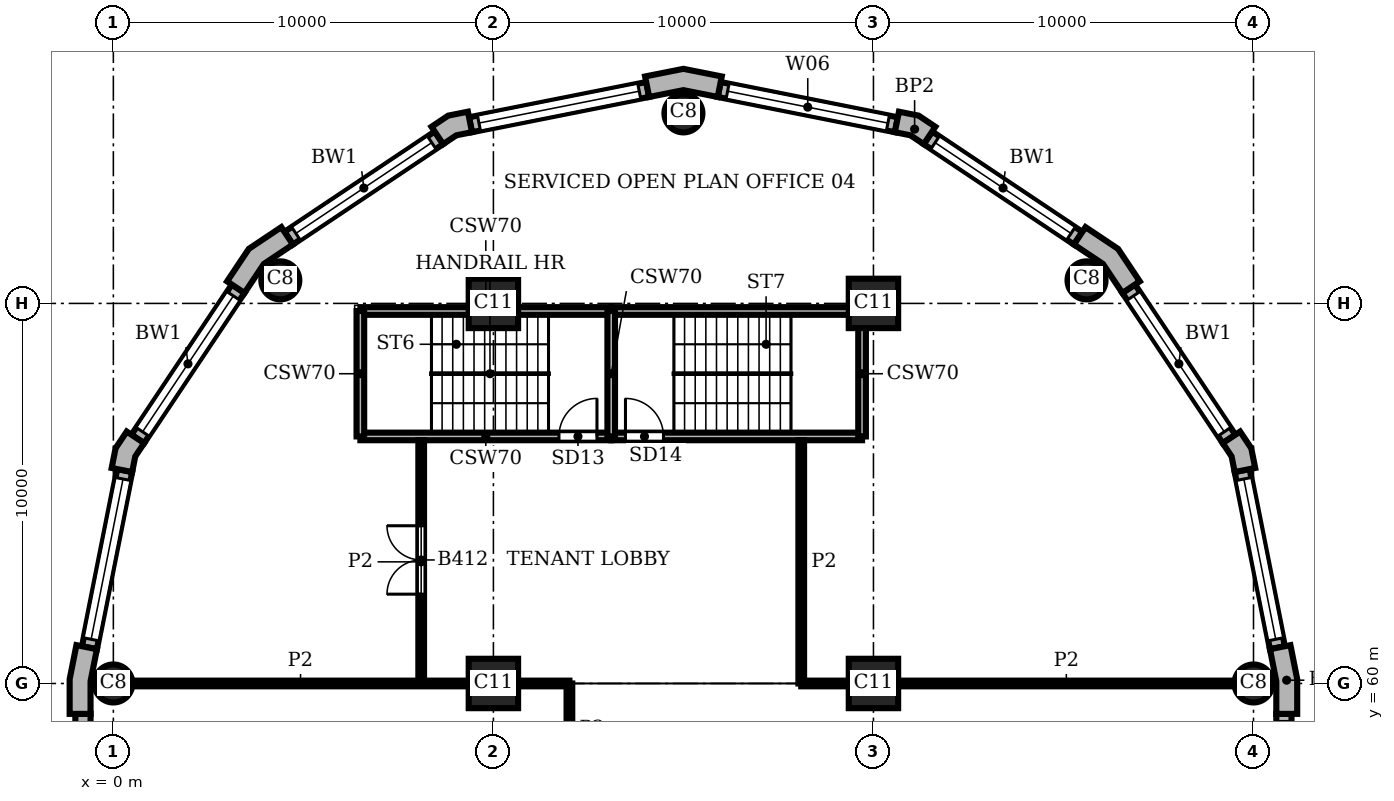
"""IFC4 building model, lengths in metres.
Left out: names, types, materials, properties, quantities, classifications, styles, units other than length and angle.
Written with IfcOpenShell. Run it as: python <this file> out.ifc"""

import sys

from ifc_helpers import new_model, si_unit, direction, frame, frame_2d, origin, origin_2d, place, context, subcontext, project, spatial, polyline, rectangle, circle, outline, extrude, element, fill, save


model = new_model("IFC4")
c1 = context("Model", 3, precision=1e-05, world=origin(), true_north=direction((0.0, 1.0)))
c2 = subcontext(c1, "Body", "Model", "MODEL_VIEW")
j1 = project(units=[si_unit("LENGTHUNIT", "METRE"), si_unit("PLANEANGLEUNIT", "RADIAN")], contexts=[c1])
p1 = place(None, origin())
s1 = spatial("IfcSite", under=j1, at=p1, CompositionType="ELEMENT")
p2 = place(p1, origin())
s2 = spatial("IfcBuilding", under=s1, at=p2, CompositionType="ELEMENT")
p3 = place(p2, frame((0.0, 0.0, 170.7)))
s3 = spatial("IfcBuildingStorey", under=s2, at=p3, CompositionType="ELEMENT", Elevation=170.7)
for number, where, z_axis, x_axis in (
    (1, (30.0, 60.0, 0.0), (0.0, 0.0, 1.0), (1.0, 0.0, 0.0)),
    (2, (25.607, 70.607, 0.0), (0.0, 0.0, 1.0), (1.0, 0.0, 0.0)),
    (3, (15.0, 75.0, 0.0), (0.0, 0.0, 1.0), (1.0, 0.0, 0.0)),
    (4, (4.393, 70.607, 0.0), (0.0, 0.0, 1.0), (1.0, 0.0, 0.0)),
    (5, (0.0, 60.0, 0.0), (0.0, 0.0, 1.0), (1.0, 0.0, 0.0)),
):
    element("IfcColumn", number, at=place(p3, frame(where, z_axis=z_axis, x_axis=x_axis)), inside=s3, PredefinedType="COLUMN", context=c2, shape_type="SweptSolid", body=[
        extrude(circle(Radius=0.5, at=origin_2d()), origin(), (0.0, 0.0, 1.0), 3.9),
    ])
for number, where, z_axis, x_axis in (
    (6, (10.0, 60.0, 0.0), (0.0, 0.0, 1.0), (1.0, 0.0, 0.0)),
    (7, (10.0, 70.0, 0.0), (0.0, 0.0, 1.0), (1.0, 0.0, 0.0)),
    (8, (20.0, 60.0, 0.0), (0.0, 0.0, 1.0), (1.0, 0.0, 0.0)),
    (9, (20.0, 70.0, 0.0), (0.0, 0.0, 1.0), (1.0, 0.0, 0.0)),
):
    element("IfcColumn", number, at=place(p3, frame(where, z_axis=z_axis, x_axis=x_axis)), inside=s3, PredefinedType="COLUMN", context=c2, shape_type="SweptSolid", body=[
        extrude(rectangle(XDim=1.3, YDim=1.3, at=origin_2d()), origin(), (0.0, 0.0, 1.0), 3.9),
    ])
p4 = place(p3, origin())
e10 = element("IfcWall", 10, at=p4, inside=s3, PredefinedType="SOLIDWALL", context=c2, shape_type="SweptSolid", body=[
    extrude(outline(polyline([(31.0, 59.2), (31.15, 59.2), (31.15, 60.113), (30.972, 61.009), (30.825, 60.98), (30.432, 60.902), (30.6, 60.059), (30.6, 59.2), (31.0, 59.2)])), origin(), (0.0, 0.0, 1.0), 3.9),
])
e11 = element("IfcWall", 11, at=p4, inside=s3, PredefinedType="SOLIDWALL", context=c2, shape_type="SweptSolid", body=[
    extrude(outline(polyline([(29.897, 65.641), (30.045, 65.67), (29.941, 66.189), (29.648, 66.629), (29.523, 66.545), (29.19, 66.323), (29.423, 65.974), (29.505, 65.563), (29.897, 65.641)])), origin(), (0.0, 0.0, 1.0), 3.9),
])
e12 = element("IfcWall", 12, at=p4, inside=s3, PredefinedType="SOLIDWALL", context=c2, shape_type="SweptSolid", body=[
    extrude(outline(polyline([(26.883, 70.497), (27.007, 70.58), (26.436, 71.436), (25.58, 72.007), (25.497, 71.883), (25.275, 71.55), (26.039, 71.039), (26.55, 70.275), (26.883, 70.497)])), origin(), (0.0, 0.0, 1.0), 3.9),
])
e13 = element("IfcWall", 13, at=p4, inside=s3, PredefinedType="SOLIDWALL", context=c2, shape_type="SweptSolid", body=[
    extrude(outline(polyline([(21.545, 74.523), (21.629, 74.648), (21.189, 74.941), (20.67, 75.045), (20.641, 74.897), (20.563, 74.505), (20.974, 74.423), (21.323, 74.19), (21.545, 74.523)])), origin(), (0.0, 0.0, 1.0), 3.9),
])
e14 = element("IfcWall", 14, at=p4, inside=s3, PredefinedType="SOLIDWALL", context=c2, shape_type="SweptSolid", body=[
    extrude(outline(polyline([(15.98, 75.825), (16.009, 75.972), (15.0, 76.173), (13.991, 75.972), (14.02, 75.825), (14.098, 75.432), (15.0, 75.612), (15.902, 75.432), (15.98, 75.825)])), origin(), (0.0, 0.0, 1.0), 3.9),
])
e15 = element("IfcWall", 15, at=p4, inside=s3, PredefinedType="SOLIDWALL", context=c2, shape_type="SweptSolid", body=[
    extrude(outline(polyline([(9.359, 74.897), (9.33, 75.045), (8.811, 74.941), (8.371, 74.648), (8.455, 74.523), (8.677, 74.19), (9.026, 74.423), (9.437, 74.505), (9.359, 74.897)])), origin(), (0.0, 0.0, 1.0), 3.9),
])
e16 = element("IfcWall", 16, at=p4, inside=s3, PredefinedType="SOLIDWALL", context=c2, shape_type="SweptSolid", body=[
    extrude(outline(polyline([(4.503, 71.883), (4.42, 72.007), (3.564, 71.436), (2.993, 70.58), (3.117, 70.497), (3.45, 70.275), (3.961, 71.039), (4.725, 71.55), (4.503, 71.883)])), origin(), (0.0, 0.0, 1.0), 3.9),
])
e17 = element("IfcWall", 17, at=p4, inside=s3, PredefinedType="SOLIDWALL", context=c2, shape_type="SweptSolid", body=[
    extrude(outline(polyline([(0.477, 66.545), (0.352, 66.629), (0.059, 66.189), (-0.045, 65.67), (0.103, 65.641), (0.495, 65.563), (0.577, 65.974), (0.81, 66.323), (0.477, 66.545)])), origin(), (0.0, 0.0, 1.0), 3.9),
])
e18 = element("IfcWall", 18, at=p4, inside=s3, PredefinedType="SOLIDWALL", context=c2, shape_type="SweptSolid", body=[
    extrude(outline(polyline([(-0.825, 60.98), (-0.972, 61.009), (-1.15, 60.113), (-1.15, 59.2), (-1.0, 59.2), (-0.6, 59.2), (-0.6, 60.059), (-0.432, 60.902), (-0.825, 60.98)])), origin(), (0.0, 0.0, 1.0), 3.9),
])
p5 = place(p3, frame((30.8, 40.8, 0.0), z_axis=(0.0, 0.0, 1.0), x_axis=(0.0, 1.0, 0.0)))
e19 = element("IfcWall", 19, at=p5, inside=s3, PredefinedType="SOLIDWALL", context=c2, shape_type="SweptSolid", body=[
    extrude(rectangle(XDim=18.4, YDim=0.4, at=frame_2d((9.2, 0.0))), origin(), (0.0, 0.0, 1.0), 3.9),
])
p6 = place(p5, frame((0.2, 0.0, 0.9)))
e20 = element("IfcOpeningElement", 20, at=p6, cuts=e19, PredefinedType="OPENING", context=c2, shape_type="SweptSolid", body=[
    extrude(rectangle(XDim=8.0, YDim=2.35, at=frame_2d((4.0, 1.175))), frame((0.0, 0.21, 0.0), z_axis=(0.0, -1.0, 0.0), x_axis=(1.0, 0.0, 0.0)), (0.0, 0.0, 1.0), 0.42),
])
p7 = place(p5, frame((10.2, 0.0, 0.9)))
e21 = element("IfcOpeningElement", 21, at=p7, cuts=e19, PredefinedType="OPENING", context=c2, shape_type="SweptSolid", body=[
    extrude(rectangle(XDim=8.0, YDim=2.35, at=frame_2d((4.0, 1.175))), frame((0.0, 0.21, 0.0), z_axis=(0.0, -1.0, 0.0), x_axis=(1.0, 0.0, 0.0)), (0.0, 0.0, 1.0), 0.42),
])
p8 = place(p3, frame((30.629, 60.941, 0.0), z_axis=(0.0, 0.0, 1.0), x_axis=(-0.195098533057, 0.98078364709, 0.0)))
e22 = element("IfcWall", 22, at=p8, inside=s3, PredefinedType="SOLIDWALL", context=c2, shape_type="SweptSolid", body=[
    extrude(rectangle(XDim=4.753, YDim=0.4, at=frame_2d((2.376, 0.0))), origin(), (0.0, 0.0, 1.0), 3.9),
])
p9 = place(p8, frame((0.226, 0.0, 0.9)))
e23 = element("IfcOpeningElement", 23, at=p9, cuts=e22, PredefinedType="OPENING", context=c2, shape_type="SweptSolid", body=[
    extrude(rectangle(XDim=4.3, YDim=2.35, at=frame_2d((2.15, 1.175))), frame((0.0, 0.21, 0.0), z_axis=(0.0, -1.0, 0.0), x_axis=(1.0, 0.0, 0.0)), (0.0, 0.0, 1.0), 0.42),
])
p10 = place(p3, frame((29.357, 66.434, 0.0), z_axis=(0.0, 0.0, 1.0), x_axis=(-0.555541552266, 0.831488775454, 0.0)))
e24 = element("IfcWall", 24, at=p10, inside=s3, PredefinedType="SOLIDWALL", context=c2, shape_type="SweptSolid", body=[
    extrude(rectangle(XDim=4.753, YDim=0.4, at=frame_2d((2.376, 0.0))), origin(), (0.0, 0.0, 1.0), 3.9),
])
p11 = place(p10, frame((0.226, 0.0, 0.9)))
e25 = element("IfcOpeningElement", 25, at=p11, cuts=e24, PredefinedType="OPENING", context=c2, shape_type="SweptSolid", body=[
    extrude(rectangle(XDim=4.3, YDim=2.35, at=frame_2d((2.15, 1.175))), frame((0.0, 0.21, 0.0), z_axis=(0.0, -1.0, 0.0), x_axis=(1.0, 0.0, 0.0)), (0.0, 0.0, 1.0), 0.42),
])
p12 = place(p3, frame((25.386, 71.716, 0.0), z_axis=(0.0, 0.0, 1.0), x_axis=(-0.831488775454, 0.555541552266, 0.0)))
e26 = element("IfcWall", 26, at=p12, inside=s3, PredefinedType="SOLIDWALL", context=c2, shape_type="SweptSolid", body=[
    extrude(rectangle(XDim=4.753, YDim=0.4, at=frame_2d((2.376, 0.0))), origin(), (0.0, 0.0, 1.0), 3.9),
])
p13 = place(p12, frame((0.226, 0.0, 0.9)))
e27 = element("IfcOpeningElement", 27, at=p13, cuts=e26, PredefinedType="OPENING", context=c2, shape_type="SweptSolid", body=[
    extrude(rectangle(XDim=4.3, YDim=2.35, at=frame_2d((2.15, 1.175))), frame((0.0, 0.21, 0.0), z_axis=(0.0, -1.0, 0.0), x_axis=(1.0, 0.0, 0.0)), (0.0, 0.0, 1.0), 0.42),
])
p14 = place(p3, frame((20.602, 74.701, 0.0), z_axis=(0.0, 0.0, 1.0), x_axis=(-0.98078364709, 0.195098533057, 0.0)))
e28 = element("IfcWall", 28, at=p14, inside=s3, PredefinedType="SOLIDWALL", context=c2, shape_type="SweptSolid", body=[
    extrude(rectangle(XDim=4.753, YDim=0.4, at=frame_2d((2.376, 0.0))), origin(), (0.0, 0.0, 1.0), 3.9),
])
p15 = place(p14, frame((0.226, 0.0, 0.9)))
e29 = element("IfcOpeningElement", 29, at=p15, cuts=e28, PredefinedType="OPENING", context=c2, shape_type="SweptSolid", body=[
    extrude(rectangle(XDim=4.3, YDim=2.35, at=frame_2d((2.15, 1.175))), frame((0.0, 0.21, 0.0), z_axis=(0.0, -1.0, 0.0), x_axis=(1.0, 0.0, 0.0)), (0.0, 0.0, 1.0), 0.42),
])
p16 = place(p3, frame((14.059, 75.629, 0.0), z_axis=(0.0, 0.0, 1.0), x_axis=(-0.98078364709, -0.195098533057, 0.0)))
e30 = element("IfcWall", 30, at=p16, inside=s3, PredefinedType="SOLIDWALL", context=c2, shape_type="SweptSolid", body=[
    extrude(rectangle(XDim=4.753, YDim=0.4, at=frame_2d((2.376, 0.0))), origin(), (0.0, 0.0, 1.0), 3.9),
])
p17 = place(p16, frame((0.226, 0.0, 0.9)))
e31 = element("IfcOpeningElement", 31, at=p17, cuts=e30, PredefinedType="OPENING", context=c2, shape_type="SweptSolid", body=[
    extrude(rectangle(XDim=4.3, YDim=2.35, at=frame_2d((2.15, 1.175))), frame((0.0, 0.21, 0.0), z_axis=(0.0, -1.0, 0.0), x_axis=(1.0, 0.0, 0.0)), (0.0, 0.0, 1.0), 0.42),
])
p18 = place(p3, frame((8.566, 74.357, 0.0), z_axis=(0.0, 0.0, 1.0), x_axis=(-0.831488775454, -0.555541552266, 0.0)))
e32 = element("IfcWall", 32, at=p18, inside=s3, PredefinedType="SOLIDWALL", context=c2, shape_type="SweptSolid", body=[
    extrude(rectangle(XDim=4.753, YDim=0.4, at=frame_2d((2.376, 0.0))), origin(), (0.0, 0.0, 1.0), 3.9),
])
p19 = place(p18, frame((0.226, 0.0, 0.9)))
e33 = element("IfcOpeningElement", 33, at=p19, cuts=e32, PredefinedType="OPENING", context=c2, shape_type="SweptSolid", body=[
    extrude(rectangle(XDim=4.3, YDim=2.35, at=frame_2d((2.15, 1.175))), frame((0.0, 0.21, 0.0), z_axis=(0.0, -1.0, 0.0), x_axis=(1.0, 0.0, 0.0)), (0.0, 0.0, 1.0), 0.42),
])
p20 = place(p3, frame((3.284, 70.386, 0.0), z_axis=(0.0, 0.0, 1.0), x_axis=(-0.555541552266, -0.831488775454, 0.0)))
e34 = element("IfcWall", 34, at=p20, inside=s3, PredefinedType="SOLIDWALL", context=c2, shape_type="SweptSolid", body=[
    extrude(rectangle(XDim=4.753, YDim=0.4, at=frame_2d((2.376, 0.0))), origin(), (0.0, 0.0, 1.0), 3.9),
])
p21 = place(p20, frame((0.226, 0.0, 0.9)))
e35 = element("IfcOpeningElement", 35, at=p21, cuts=e34, PredefinedType="OPENING", context=c2, shape_type="SweptSolid", body=[
    extrude(rectangle(XDim=4.3, YDim=2.35, at=frame_2d((2.15, 1.175))), frame((0.0, 0.21, 0.0), z_axis=(0.0, -1.0, 0.0), x_axis=(1.0, 0.0, 0.0)), (0.0, 0.0, 1.0), 0.42),
])
p22 = place(p3, frame((0.299, 65.602, 0.0), z_axis=(0.0, 0.0, 1.0), x_axis=(-0.195098533057, -0.98078364709, 0.0)))
e36 = element("IfcWall", 36, at=p22, inside=s3, PredefinedType="SOLIDWALL", context=c2, shape_type="SweptSolid", body=[
    extrude(rectangle(XDim=4.753, YDim=0.4, at=frame_2d((2.376, 0.0))), origin(), (0.0, 0.0, 1.0), 3.9),
])
p23 = place(p22, frame((0.226, 0.0, 0.9)))
e37 = element("IfcOpeningElement", 37, at=p23, cuts=e36, PredefinedType="OPENING", context=c2, shape_type="SweptSolid", body=[
    extrude(rectangle(XDim=4.3, YDim=2.35, at=frame_2d((2.15, 1.175))), frame((0.0, 0.21, 0.0), z_axis=(0.0, -1.0, 0.0), x_axis=(1.0, 0.0, 0.0)), (0.0, 0.0, 1.0), 0.42),
])
p24 = place(p3, frame((-0.8, 59.2, 0.0), z_axis=(0.0, 0.0, 1.0), x_axis=(0.0, -1.0, 0.0)))
e38 = element("IfcWall", 38, at=p24, inside=s3, PredefinedType="SOLIDWALL", context=c2, shape_type="SweptSolid", body=[
    extrude(rectangle(XDim=18.4, YDim=0.4, at=frame_2d((9.2, 0.0))), origin(), (0.0, 0.0, 1.0), 3.9),
])
p25 = place(p24, frame((3.75, 0.0, 0.9)))
e39 = element("IfcOpeningElement", 39, at=p25, cuts=e38, PredefinedType="OPENING", context=c2, shape_type="SweptSolid", body=[
    extrude(rectangle(XDim=0.9, YDim=2.35, at=frame_2d((0.45, 1.175))), frame((0.0, 0.21, 0.0), z_axis=(0.0, -1.0, 0.0), x_axis=(1.0, 0.0, 0.0)), (0.0, 0.0, 1.0), 0.42),
])
p26 = place(p24, frame((13.75, 0.0, 0.9)))
e40 = element("IfcOpeningElement", 40, at=p26, cuts=e38, PredefinedType="OPENING", context=c2, shape_type="SweptSolid", body=[
    extrude(rectangle(XDim=0.9, YDim=2.35, at=frame_2d((0.45, 1.175))), frame((0.0, 0.21, 0.0), z_axis=(0.0, -1.0, 0.0), x_axis=(1.0, 0.0, 0.0)), (0.0, 0.0, 1.0), 0.42),
])
p27 = place(p3, frame((6.5, 66.5, 0.0), z_axis=(0.0, 0.0, 1.0), x_axis=(1.0, 0.0, 0.0)))
e41 = element("IfcWall", 41, at=p27, inside=s3, PredefinedType="SHEAR", context=c2, shape_type="SweptSolid", body=[
    extrude(rectangle(XDim=6.6, YDim=0.2, at=frame_2d((3.3, 0.0))), origin(), (0.0, 0.0, 1.0), 3.58),
])
p28 = place(p27, frame((5.225, 0.0, 0.0)))
e42 = element("IfcOpeningElement", 42, at=p28, cuts=e41, PredefinedType="OPENING", context=c2, shape_type="SweptSolid", body=[
    extrude(rectangle(XDim=1.0, YDim=2.1, at=frame_2d((0.5, 1.05))), frame((0.0, 0.11, 0.0), z_axis=(0.0, -1.0, 0.0), x_axis=(1.0, 0.0, 0.0)), (0.0, 0.0, 1.0), 0.22),
])
p29 = place(p3, frame((13.1, 66.5, 0.0), z_axis=(0.0, 0.0, 1.0), x_axis=(1.0, 0.0, 0.0)))
e43 = element("IfcWall", 43, at=p29, inside=s3, PredefinedType="SHEAR", context=c2, shape_type="SweptSolid", body=[
    extrude(rectangle(XDim=6.6, YDim=0.2, at=frame_2d((3.3, 0.0))), origin(), (0.0, 0.0, 1.0), 3.58),
])
p30 = place(p29, frame((0.375, 0.0, 0.0)))
e44 = element("IfcOpeningElement", 44, at=p30, cuts=e43, PredefinedType="OPENING", context=c2, shape_type="SweptSolid", body=[
    extrude(rectangle(XDim=1.0, YDim=2.1, at=frame_2d((0.5, 1.05))), frame((0.0, 0.11, 0.0), z_axis=(0.0, -1.0, 0.0), x_axis=(1.0, 0.0, 0.0)), (0.0, 0.0, 1.0), 0.22),
])
p31 = place(p3, frame((6.5, 69.8, 0.0), z_axis=(0.0, 0.0, 1.0), x_axis=(1.0, 0.0, 0.0)))
e45 = element("IfcWall", 45, at=p31, inside=s3, PredefinedType="SHEAR", context=c2, shape_type="SweptSolid", body=[
    extrude(rectangle(XDim=6.6, YDim=0.2, at=frame_2d((3.3, 0.0))), origin(), (0.0, 0.0, 1.0), 3.58),
])
p32 = place(p3, frame((13.1, 69.8, 0.0), z_axis=(0.0, 0.0, 1.0), x_axis=(1.0, 0.0, 0.0)))
e46 = element("IfcWall", 46, at=p32, inside=s3, PredefinedType="SHEAR", context=c2, shape_type="SweptSolid", body=[
    extrude(rectangle(XDim=6.6, YDim=0.2, at=frame_2d((3.3, 0.0))), origin(), (0.0, 0.0, 1.0), 3.58),
])
for number, where, z_axis, x_axis in (
    (47, (6.5, 66.5, 0.0), (0.0, 0.0, 1.0), (0.0, 1.0, 0.0)),
    (48, (13.1, 66.5, 0.0), (0.0, 0.0, 1.0), (0.0, 1.0, 0.0)),
    (49, (19.7, 66.5, 0.0), (0.0, 0.0, 1.0), (0.0, 1.0, 0.0)),
):
    element("IfcWall", number, at=place(p3, frame(where, z_axis=z_axis, x_axis=x_axis)), inside=s3, PredefinedType="SHEAR", context=c2, shape_type="SweptSolid", body=[
        extrude(rectangle(XDim=3.3, YDim=0.2, at=frame_2d((1.65, 0.0))), origin(), (0.0, 0.0, 1.0), 3.58),
    ])
p33 = place(p3, frame((8.1, 60.0, 0.0), z_axis=(0.0, 0.0, 1.0), x_axis=(0.0, 1.0, 0.0)))
e50 = element("IfcWall", 50, at=p33, inside=s3, PredefinedType="PARTITIONING", context=c2, shape_type="SweptSolid", body=[
    extrude(rectangle(XDim=6.4, YDim=0.15, at=frame_2d((3.2, 0.0))), origin(), (0.0, 0.0, 1.0), 3.58),
])
p34 = place(p33, frame((2.35, 0.0, 0.0)))
e51 = element("IfcOpeningElement", 51, at=p34, cuts=e50, PredefinedType="OPENING", context=c2, shape_type="SweptSolid", body=[
    extrude(rectangle(XDim=1.8, YDim=2.1, at=frame_2d((0.9, 1.05))), frame((0.0, 0.085, 0.0), z_axis=(0.0, -1.0, 0.0), x_axis=(1.0, 0.0, 0.0)), (0.0, 0.0, 1.0), 0.17),
])
p35 = place(p3, frame((12.0, 57.6, 0.0), z_axis=(0.0, 0.0, 1.0), x_axis=(0.0, 1.0, 0.0)))
e52 = element("IfcWall", 52, at=p35, inside=s3, PredefinedType="PARTITIONING", context=c2, shape_type="SweptSolid", body=[
    extrude(rectangle(XDim=2.4, YDim=0.15, at=frame_2d((1.2, 0.0))), origin(), (0.0, 0.0, 1.0), 3.58),
])
p36 = place(p3, frame((18.1, 60.0, 0.0), z_axis=(0.0, 0.0, 1.0), x_axis=(0.0, 1.0, 0.0)))
e53 = element("IfcWall", 53, at=p36, inside=s3, PredefinedType="PARTITIONING", context=c2, shape_type="SweptSolid", body=[
    extrude(rectangle(XDim=6.4, YDim=0.15, at=frame_2d((3.2, 0.0))), origin(), (0.0, 0.0, 1.0), 3.58),
])
p37 = place(p3, frame((0.5, 60.0, 0.0), z_axis=(0.0, 0.0, 1.0), x_axis=(1.0, 0.0, 0.0)))
e54 = element("IfcWall", 54, at=p37, inside=s3, PredefinedType="PARTITIONING", context=c2, shape_type="SweptSolid", body=[
    extrude(rectangle(XDim=8.85, YDim=0.15, at=frame_2d((4.425, 0.0))), origin(), (0.0, 0.0, 1.0), 3.58),
])
p38 = place(p3, frame((10.65, 60.0, 0.0), z_axis=(0.0, 0.0, 1.0), x_axis=(1.0, 0.0, 0.0)))
e55 = element("IfcWall", 55, at=p38, inside=s3, PredefinedType="PARTITIONING", context=c2, shape_type="SweptSolid", body=[
    extrude(rectangle(XDim=1.35, YDim=0.15, at=frame_2d((0.675, 0.0))), origin(), (0.0, 0.0, 1.0), 3.58),
])
p39 = place(p3, frame((18.1, 60.0, 0.0), z_axis=(0.0, 0.0, 1.0), x_axis=(1.0, 0.0, 0.0)))
e56 = element("IfcWall", 56, at=p39, inside=s3, PredefinedType="PARTITIONING", context=c2, shape_type="SweptSolid", body=[
    extrude(rectangle(XDim=1.25, YDim=0.15, at=frame_2d((0.625, 0.0))), origin(), (0.0, 0.0, 1.0), 3.58),
])
p40 = place(p3, frame((20.65, 60.0, 0.0), z_axis=(0.0, 0.0, 1.0), x_axis=(1.0, 0.0, 0.0)))
e57 = element("IfcWall", 57, at=p40, inside=s3, PredefinedType="PARTITIONING", context=c2, shape_type="SweptSolid", body=[
    extrude(rectangle(XDim=8.85, YDim=0.15, at=frame_2d((4.425, 0.0))), origin(), (0.0, 0.0, 1.0), 3.58),
])
p41 = place(p9, origin())
e58 = element("IfcWindow", 58, at=p41, inside=s3, PartitioningType="SINGLE_PANEL", PredefinedType="WINDOW", context=c2, shape_type="SweptSolid", body=[
    extrude(rectangle(XDim=4.3, YDim=2.35, at=frame_2d((2.15, 1.175))), frame((0.0, 0.16, 0.0), z_axis=(0.0, -1.0, 0.0), x_axis=(1.0, 0.0, 0.0)), (0.0, 0.0, 1.0), 0.06),
])
fill(e23, e58)
p42 = place(p11, origin())
e59 = element("IfcWindow", 59, at=p42, inside=s3, PartitioningType="SINGLE_PANEL", PredefinedType="WINDOW", context=c2, shape_type="SweptSolid", body=[
    extrude(rectangle(XDim=4.3, YDim=2.35, at=frame_2d((2.15, 1.175))), frame((0.0, 0.16, 0.0), z_axis=(0.0, -1.0, 0.0), x_axis=(1.0, 0.0, 0.0)), (0.0, 0.0, 1.0), 0.06),
])
fill(e25, e59)
p43 = place(p13, origin())
e60 = element("IfcWindow", 60, at=p43, inside=s3, PartitioningType="SINGLE_PANEL", PredefinedType="WINDOW", context=c2, shape_type="SweptSolid", body=[
    extrude(rectangle(XDim=4.3, YDim=2.35, at=frame_2d((2.15, 1.175))), frame((0.0, 0.16, 0.0), z_axis=(0.0, -1.0, 0.0), x_axis=(1.0, 0.0, 0.0)), (0.0, 0.0, 1.0), 0.06),
])
fill(e27, e60)
p44 = place(p15, origin())
e61 = element("IfcWindow", 61, at=p44, inside=s3, PartitioningType="SINGLE_PANEL", PredefinedType="WINDOW", context=c2, shape_type="SweptSolid", body=[
    extrude(rectangle(XDim=4.3, YDim=2.35, at=frame_2d((2.15, 1.175))), frame((0.0, 0.16, 0.0), z_axis=(0.0, -1.0, 0.0), x_axis=(1.0, 0.0, 0.0)), (0.0, 0.0, 1.0), 0.06),
])
fill(e29, e61)
p45 = place(p17, origin())
e62 = element("IfcWindow", 62, at=p45, inside=s3, PartitioningType="SINGLE_PANEL", PredefinedType="WINDOW", context=c2, shape_type="SweptSolid", body=[
    extrude(rectangle(XDim=4.3, YDim=2.35, at=frame_2d((2.15, 1.175))), frame((0.0, 0.16, 0.0), z_axis=(0.0, -1.0, 0.0), x_axis=(1.0, 0.0, 0.0)), (0.0, 0.0, 1.0), 0.06),
])
fill(e31, e62)
p46 = place(p19, origin())
e63 = element("IfcWindow", 63, at=p46, inside=s3, PartitioningType="SINGLE_PANEL", PredefinedType="WINDOW", context=c2, shape_type="SweptSolid", body=[
    extrude(rectangle(XDim=4.3, YDim=2.35, at=frame_2d((2.15, 1.175))), frame((0.0, 0.16, 0.0), z_axis=(0.0, -1.0, 0.0), x_axis=(1.0, 0.0, 0.0)), (0.0, 0.0, 1.0), 0.06),
])
fill(e33, e63)
p47 = place(p21, origin())
e64 = element("IfcWindow", 64, at=p47, inside=s3, PartitioningType="SINGLE_PANEL", PredefinedType="WINDOW", context=c2, shape_type="SweptSolid", body=[
    extrude(rectangle(XDim=4.3, YDim=2.35, at=frame_2d((2.15, 1.175))), frame((0.0, 0.16, 0.0), z_axis=(0.0, -1.0, 0.0), x_axis=(1.0, 0.0, 0.0)), (0.0, 0.0, 1.0), 0.06),
])
fill(e35, e64)
p48 = place(p23, origin())
e65 = element("IfcWindow", 65, at=p48, inside=s3, PartitioningType="SINGLE_PANEL", PredefinedType="WINDOW", context=c2, shape_type="SweptSolid", body=[
    extrude(rectangle(XDim=4.3, YDim=2.35, at=frame_2d((2.15, 1.175))), frame((0.0, 0.16, 0.0), z_axis=(0.0, -1.0, 0.0), x_axis=(1.0, 0.0, 0.0)), (0.0, 0.0, 1.0), 0.06),
])
fill(e37, e65)
p49 = place(p28, origin())
e66 = element("IfcDoor", 66, at=p49, inside=s3, OperationType="SINGLE_SWING_RIGHT", PredefinedType="DOOR", context=c2, shape_type="SweptSolid", body=[
    extrude(rectangle(XDim=1.0, YDim=2.1, at=frame_2d((0.5, 1.05))), frame((0.0, 0.025, 0.0), z_axis=(0.0, -1.0, 0.0), x_axis=(1.0, 0.0, 0.0)), (0.0, 0.0, 1.0), 0.05),
])
fill(e42, e66)
p50 = place(p30, origin())
e67 = element("IfcDoor", 67, at=p50, inside=s3, OperationType="SINGLE_SWING_LEFT", PredefinedType="DOOR", context=c2, shape_type="SweptSolid", body=[
    extrude(rectangle(XDim=1.0, YDim=2.1, at=frame_2d((0.5, 1.05))), frame((0.0, 0.025, 0.0), z_axis=(0.0, -1.0, 0.0), x_axis=(1.0, 0.0, 0.0)), (0.0, 0.0, 1.0), 0.05),
])
fill(e44, e67)
p51 = place(p34, origin())
e68 = element("IfcDoor", 68, at=p51, inside=s3, OperationType="DOUBLE_DOOR_SINGLE_SWING", PredefinedType="DOOR", context=c2, shape_type="SweptSolid", body=[
    extrude(rectangle(XDim=1.8, YDim=2.1, at=frame_2d((0.9, 1.05))), frame((0.0, 0.025, 0.0), z_axis=(0.0, -1.0, 0.0), x_axis=(1.0, 0.0, 0.0)), (0.0, 0.0, 1.0), 0.05),
])
fill(e51, e68)
save(model, sys.argv[1])
